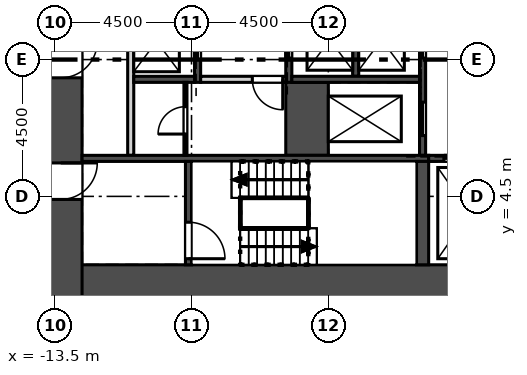
"""IFC4 building model, lengths in metres.
Left out: names, types, materials, properties, quantities, classifications, styles, units other than length and angle.
Written with IfcOpenShell. Run it as: python <this file> out.ifc"""

import sys

from ifc_helpers import new_model, si_unit, direction, frame, frame_2d, origin, place, context, subcontext, project, spatial, rectangle, extrude, element, fill, save


model = new_model("IFC4")
c1 = context("Model", 3, precision=1e-05, world=origin(), true_north=direction((0.0, 1.0)))
c2 = subcontext(c1, "Body", "Model", "MODEL_VIEW")
j1 = project(units=[si_unit("LENGTHUNIT", "METRE"), si_unit("PLANEANGLEUNIT", "RADIAN")], contexts=[c1])
p1 = place(None, origin())
s1 = spatial("IfcSite", under=j1, at=p1, CompositionType="ELEMENT")
p2 = place(p1, origin())
s2 = spatial("IfcBuilding", under=s1, at=p2, CompositionType="ELEMENT")
p3 = place(p2, frame((0.0, 0.0, 14.0)))
s3 = spatial("IfcBuildingStorey", under=s2, at=p3, CompositionType="ELEMENT", Elevation=14.0)
p4 = place(p3, frame((-14.0, 1.55, 0.0), z_axis=(0.0, 0.0, 1.0), x_axis=(1.0, 0.0, 0.0)))
e1 = element("IfcWall", 1, at=p4, inside=s3, PredefinedType="SHEAR", context=c2, shape_type="SweptSolid", body=[
    extrude(rectangle(XDim=28.0, YDim=1.4, at=frame_2d((14.0, 0.0))), origin(), (0.0, 0.0, 1.0), 6.0),
])
p5 = place(p3, frame((-13.3, 11.052, 0.0), z_axis=(0.0, 0.0, 1.0), x_axis=(0.0, -1.0, 0.0)))
e2 = element("IfcWall", 2, at=p5, inside=s3, PredefinedType="SHEAR", context=c2, shape_type="SweptSolid", body=[
    extrude(rectangle(XDim=10.202, YDim=1.4, at=frame_2d((5.101, 0.0))), origin(), (0.0, 0.0, 1.0), 6.0),
])
p6 = place(p5, frame((5.453, 0.0, 0.0)))
e3 = element("IfcOpeningElement", 3, at=p6, cuts=e2, PredefinedType="OPENING", context=c2, shape_type="SweptSolid", body=[
    extrude(rectangle(XDim=1.2, YDim=2.1, at=frame_2d((0.6, 1.05))), frame((0.0, 0.71, 0.0), z_axis=(0.0, -1.0, 0.0), x_axis=(1.0, 0.0, 0.0)), (0.0, 0.0, 1.0), 1.42),
])
p7 = place(p5, frame((1.453, 0.0, 0.0)))
e4 = element("IfcOpeningElement", 4, at=p7, cuts=e2, PredefinedType="OPENING", context=c2, shape_type="SweptSolid", body=[
    extrude(rectangle(XDim=1.2, YDim=2.1, at=frame_2d((0.6, 1.05))), frame((0.0, 0.71, 0.0), z_axis=(0.0, -1.0, 0.0), x_axis=(1.0, 0.0, 0.0)), (0.0, 0.0, 1.0), 1.42),
])
p8 = place(p3, frame((-4.853, 74.393, 0.0), z_axis=(0.0, 0.0, 1.0), x_axis=(-0.49999894854, -0.866026010844, 0.0)))
e5 = element("IfcWall", 5, at=p8, inside=s3, PredefinedType="SOLIDWALL", context=c2, shape_type="SweptSolid", body=[
    extrude(rectangle(XDim=76.0, YDim=0.34, at=frame_2d((38.0, 0.0))), origin(), (0.0, 0.0, 1.0), 5.7),
])
p9 = place(p8, frame((1.058, 0.0, 0.9)))
e6 = element("IfcOpeningElement", 6, at=p9, cuts=e5, PredefinedType="OPENING", context=c2, shape_type="SweptSolid", body=[
    extrude(rectangle(XDim=1.885, YDim=3.5, at=frame_2d((0.942, 1.75))), frame((0.0, 0.18, 0.0), z_axis=(0.0, -1.0, 0.0), x_axis=(1.0, 0.0, 0.0)), (0.0, 0.0, 1.0), 0.36),
])
p10 = place(p8, frame((4.058, 0.0, 0.9)))
e7 = element("IfcOpeningElement", 7, at=p10, cuts=e5, PredefinedType="OPENING", context=c2, shape_type="SweptSolid", body=[
    extrude(rectangle(XDim=1.885, YDim=3.5, at=frame_2d((0.942, 1.75))), frame((0.0, 0.18, 0.0), z_axis=(0.0, -1.0, 0.0), x_axis=(1.0, 0.0, 0.0)), (0.0, 0.0, 1.0), 0.36),
])
p11 = place(p8, frame((7.058, 0.0, 0.9)))
e8 = element("IfcOpeningElement", 8, at=p11, cuts=e5, PredefinedType="OPENING", context=c2, shape_type="SweptSolid", body=[
    extrude(rectangle(XDim=1.885, YDim=3.5, at=frame_2d((0.942, 1.75))), frame((0.0, 0.18, 0.0), z_axis=(0.0, -1.0, 0.0), x_axis=(1.0, 0.0, 0.0)), (0.0, 0.0, 1.0), 0.36),
])
p12 = place(p8, frame((10.058, 0.0, 0.9)))
e9 = element("IfcOpeningElement", 9, at=p12, cuts=e5, PredefinedType="OPENING", context=c2, shape_type="SweptSolid", body=[
    extrude(rectangle(XDim=1.885, YDim=3.5, at=frame_2d((0.942, 1.75))), frame((0.0, 0.18, 0.0), z_axis=(0.0, -1.0, 0.0), x_axis=(1.0, 0.0, 0.0)), (0.0, 0.0, 1.0), 0.36),
])
p13 = place(p8, frame((13.058, 0.0, 0.9)))
e10 = element("IfcOpeningElement", 10, at=p13, cuts=e5, PredefinedType="OPENING", context=c2, shape_type="SweptSolid", body=[
    extrude(rectangle(XDim=1.885, YDim=3.5, at=frame_2d((0.942, 1.75))), frame((0.0, 0.18, 0.0), z_axis=(0.0, -1.0, 0.0), x_axis=(1.0, 0.0, 0.0)), (0.0, 0.0, 1.0), 0.36),
])
p14 = place(p8, frame((16.058, 0.0, 0.9)))
e11 = element("IfcOpeningElement", 11, at=p14, cuts=e5, PredefinedType="OPENING", context=c2, shape_type="SweptSolid", body=[
    extrude(rectangle(XDim=1.885, YDim=3.5, at=frame_2d((0.942, 1.75))), frame((0.0, 0.18, 0.0), z_axis=(0.0, -1.0, 0.0), x_axis=(1.0, 0.0, 0.0)), (0.0, 0.0, 1.0), 0.36),
])
p15 = place(p8, frame((19.058, 0.0, 0.9)))
e12 = element("IfcOpeningElement", 12, at=p15, cuts=e5, PredefinedType="OPENING", context=c2, shape_type="SweptSolid", body=[
    extrude(rectangle(XDim=1.885, YDim=3.5, at=frame_2d((0.942, 1.75))), frame((0.0, 0.18, 0.0), z_axis=(0.0, -1.0, 0.0), x_axis=(1.0, 0.0, 0.0)), (0.0, 0.0, 1.0), 0.36),
])
p16 = place(p8, frame((22.058, 0.0, 0.9)))
e13 = element("IfcOpeningElement", 13, at=p16, cuts=e5, PredefinedType="OPENING", context=c2, shape_type="SweptSolid", body=[
    extrude(rectangle(XDim=1.885, YDim=3.5, at=frame_2d((0.942, 1.75))), frame((0.0, 0.18, 0.0), z_axis=(0.0, -1.0, 0.0), x_axis=(1.0, 0.0, 0.0)), (0.0, 0.0, 1.0), 0.36),
])
p17 = place(p8, frame((25.058, 0.0, 0.9)))
e14 = element("IfcOpeningElement", 14, at=p17, cuts=e5, PredefinedType="OPENING", context=c2, shape_type="SweptSolid", body=[
    extrude(rectangle(XDim=1.885, YDim=3.5, at=frame_2d((0.942, 1.75))), frame((0.0, 0.18, 0.0), z_axis=(0.0, -1.0, 0.0), x_axis=(1.0, 0.0, 0.0)), (0.0, 0.0, 1.0), 0.36),
])
p18 = place(p8, frame((28.058, 0.0, 0.9)))
e15 = element("IfcOpeningElement", 15, at=p18, cuts=e5, PredefinedType="OPENING", context=c2, shape_type="SweptSolid", body=[
    extrude(rectangle(XDim=1.885, YDim=3.5, at=frame_2d((0.942, 1.75))), frame((0.0, 0.18, 0.0), z_axis=(0.0, -1.0, 0.0), x_axis=(1.0, 0.0, 0.0)), (0.0, 0.0, 1.0), 0.36),
])
p19 = place(p8, frame((31.058, 0.0, 0.9)))
e16 = element("IfcOpeningElement", 16, at=p19, cuts=e5, PredefinedType="OPENING", context=c2, shape_type="SweptSolid", body=[
    extrude(rectangle(XDim=1.885, YDim=3.5, at=frame_2d((0.942, 1.75))), frame((0.0, 0.18, 0.0), z_axis=(0.0, -1.0, 0.0), x_axis=(1.0, 0.0, 0.0)), (0.0, 0.0, 1.0), 0.36),
])
p20 = place(p8, frame((34.058, 0.0, 0.9)))
e17 = element("IfcOpeningElement", 17, at=p20, cuts=e5, PredefinedType="OPENING", context=c2, shape_type="SweptSolid", body=[
    extrude(rectangle(XDim=1.885, YDim=3.5, at=frame_2d((0.942, 1.75))), frame((0.0, 0.18, 0.0), z_axis=(0.0, -1.0, 0.0), x_axis=(1.0, 0.0, 0.0)), (0.0, 0.0, 1.0), 0.36),
])
p21 = place(p8, frame((37.058, 0.0, 0.9)))
e18 = element("IfcOpeningElement", 18, at=p21, cuts=e5, PredefinedType="OPENING", context=c2, shape_type="SweptSolid", body=[
    extrude(rectangle(XDim=1.885, YDim=3.5, at=frame_2d((0.942, 1.75))), frame((0.0, 0.18, 0.0), z_axis=(0.0, -1.0, 0.0), x_axis=(1.0, 0.0, 0.0)), (0.0, 0.0, 1.0), 0.36),
])
p22 = place(p8, frame((40.058, 0.0, 0.9)))
e19 = element("IfcOpeningElement", 19, at=p22, cuts=e5, PredefinedType="OPENING", context=c2, shape_type="SweptSolid", body=[
    extrude(rectangle(XDim=1.885, YDim=3.5, at=frame_2d((0.942, 1.75))), frame((0.0, 0.18, 0.0), z_axis=(0.0, -1.0, 0.0), x_axis=(1.0, 0.0, 0.0)), (0.0, 0.0, 1.0), 0.36),
])
p23 = place(p8, frame((43.058, 0.0, 0.9)))
e20 = element("IfcOpeningElement", 20, at=p23, cuts=e5, PredefinedType="OPENING", context=c2, shape_type="SweptSolid", body=[
    extrude(rectangle(XDim=1.885, YDim=3.5, at=frame_2d((0.942, 1.75))), frame((0.0, 0.18, 0.0), z_axis=(0.0, -1.0, 0.0), x_axis=(1.0, 0.0, 0.0)), (0.0, 0.0, 1.0), 0.36),
])
p24 = place(p8, frame((46.058, 0.0, 0.9)))
e21 = element("IfcOpeningElement", 21, at=p24, cuts=e5, PredefinedType="OPENING", context=c2, shape_type="SweptSolid", body=[
    extrude(rectangle(XDim=1.885, YDim=3.5, at=frame_2d((0.942, 1.75))), frame((0.0, 0.18, 0.0), z_axis=(0.0, -1.0, 0.0), x_axis=(1.0, 0.0, 0.0)), (0.0, 0.0, 1.0), 0.36),
])
p25 = place(p8, frame((49.058, 0.0, 0.9)))
e22 = element("IfcOpeningElement", 22, at=p25, cuts=e5, PredefinedType="OPENING", context=c2, shape_type="SweptSolid", body=[
    extrude(rectangle(XDim=1.885, YDim=3.5, at=frame_2d((0.942, 1.75))), frame((0.0, 0.18, 0.0), z_axis=(0.0, -1.0, 0.0), x_axis=(1.0, 0.0, 0.0)), (0.0, 0.0, 1.0), 0.36),
])
p26 = place(p8, frame((52.058, 0.0, 0.9)))
e23 = element("IfcOpeningElement", 23, at=p26, cuts=e5, PredefinedType="OPENING", context=c2, shape_type="SweptSolid", body=[
    extrude(rectangle(XDim=1.885, YDim=3.5, at=frame_2d((0.942, 1.75))), frame((0.0, 0.18, 0.0), z_axis=(0.0, -1.0, 0.0), x_axis=(1.0, 0.0, 0.0)), (0.0, 0.0, 1.0), 0.36),
])
p27 = place(p8, frame((55.058, 0.0, 0.9)))
e24 = element("IfcOpeningElement", 24, at=p27, cuts=e5, PredefinedType="OPENING", context=c2, shape_type="SweptSolid", body=[
    extrude(rectangle(XDim=1.885, YDim=3.5, at=frame_2d((0.942, 1.75))), frame((0.0, 0.18, 0.0), z_axis=(0.0, -1.0, 0.0), x_axis=(1.0, 0.0, 0.0)), (0.0, 0.0, 1.0), 0.36),
])
p28 = place(p8, frame((58.058, 0.0, 0.9)))
e25 = element("IfcOpeningElement", 25, at=p28, cuts=e5, PredefinedType="OPENING", context=c2, shape_type="SweptSolid", body=[
    extrude(rectangle(XDim=1.885, YDim=3.5, at=frame_2d((0.942, 1.75))), frame((0.0, 0.18, 0.0), z_axis=(0.0, -1.0, 0.0), x_axis=(1.0, 0.0, 0.0)), (0.0, 0.0, 1.0), 0.36),
])
p29 = place(p8, frame((61.058, 0.0, 0.9)))
e26 = element("IfcOpeningElement", 26, at=p29, cuts=e5, PredefinedType="OPENING", context=c2, shape_type="SweptSolid", body=[
    extrude(rectangle(XDim=1.885, YDim=3.5, at=frame_2d((0.942, 1.75))), frame((0.0, 0.18, 0.0), z_axis=(0.0, -1.0, 0.0), x_axis=(1.0, 0.0, 0.0)), (0.0, 0.0, 1.0), 0.36),
])
p30 = place(p8, frame((64.058, 0.0, 0.9)))
e27 = element("IfcOpeningElement", 27, at=p30, cuts=e5, PredefinedType="OPENING", context=c2, shape_type="SweptSolid", body=[
    extrude(rectangle(XDim=1.885, YDim=3.5, at=frame_2d((0.942, 1.75))), frame((0.0, 0.18, 0.0), z_axis=(0.0, -1.0, 0.0), x_axis=(1.0, 0.0, 0.0)), (0.0, 0.0, 1.0), 0.36),
])
p31 = place(p8, frame((67.058, 0.0, 0.9)))
e28 = element("IfcOpeningElement", 28, at=p31, cuts=e5, PredefinedType="OPENING", context=c2, shape_type="SweptSolid", body=[
    extrude(rectangle(XDim=1.885, YDim=3.5, at=frame_2d((0.942, 1.75))), frame((0.0, 0.18, 0.0), z_axis=(0.0, -1.0, 0.0), x_axis=(1.0, 0.0, 0.0)), (0.0, 0.0, 1.0), 0.36),
])
p32 = place(p8, frame((70.058, 0.0, 0.9)))
e29 = element("IfcOpeningElement", 29, at=p32, cuts=e5, PredefinedType="OPENING", context=c2, shape_type="SweptSolid", body=[
    extrude(rectangle(XDim=1.885, YDim=3.5, at=frame_2d((0.942, 1.75))), frame((0.0, 0.18, 0.0), z_axis=(0.0, -1.0, 0.0), x_axis=(1.0, 0.0, 0.0)), (0.0, 0.0, 1.0), 0.36),
])
p33 = place(p8, frame((73.058, 0.0, 0.9)))
e30 = element("IfcOpeningElement", 30, at=p33, cuts=e5, PredefinedType="OPENING", context=c2, shape_type="SweptSolid", body=[
    extrude(rectangle(XDim=1.885, YDim=3.5, at=frame_2d((0.942, 1.75))), frame((0.0, 0.18, 0.0), z_axis=(0.0, -1.0, 0.0), x_axis=(1.0, 0.0, 0.0)), (0.0, 0.0, 1.0), 0.36),
])
p34 = place(p3, frame((-11.0, 5.85, 0.0), z_axis=(0.0, 0.0, 1.0), x_axis=(0.0, 1.0, 0.0)))
e31 = element("IfcWall", 31, at=p34, inside=s3, PredefinedType="SOLIDWALL", context=c2, shape_type="SweptSolid", body=[
    extrude(rectangle(XDim=7.4, YDim=0.2, at=frame_2d((3.7, 0.0))), origin(), (0.0, 0.0, 1.0), 5.7),
])
p35 = place(p3, frame((-8.8, 8.25, -0.3), z_axis=(0.0, 0.0, 1.0), x_axis=(0.0, 1.0, 0.0)))
e32 = element("IfcWall", 32, at=p35, inside=s3, PredefinedType="SOLIDWALL", context=c2, shape_type="SweptSolid", body=[
    extrude(rectangle(XDim=5.2, YDim=0.2, at=frame_2d((2.6, 0.0))), origin(), (0.0, 0.0, 1.0), 6.0),
])
p36 = place(p35, frame((0.75, 0.0, 0.3)))
e33 = element("IfcOpeningElement", 33, at=p36, cuts=e32, PredefinedType="OPENING", context=c2, shape_type="SweptSolid", body=[
    extrude(rectangle(XDim=1.2, YDim=2.1, at=frame_2d((0.6, 1.05))), frame((0.0, 0.11, 0.0), z_axis=(0.0, -1.0, 0.0), x_axis=(1.0, 0.0, 0.0)), (0.0, 0.0, 1.0), 0.22),
])
p37 = place(p35, frame((3.25, 0.0, 0.3)))
e34 = element("IfcOpeningElement", 34, at=p37, cuts=e32, PredefinedType="OPENING", context=c2, shape_type="SweptSolid", body=[
    extrude(rectangle(XDim=1.2, YDim=2.1, at=frame_2d((0.6, 1.05))), frame((0.0, 0.11, 0.0), z_axis=(0.0, -1.0, 0.0), x_axis=(1.0, 0.0, 0.0)), (0.0, 0.0, 1.0), 0.22),
])
p38 = place(p3, frame((-5.8, 8.25, -0.3), z_axis=(0.0, 0.0, 1.0), x_axis=(0.0, 1.0, 0.0)))
e35 = element("IfcWall", 35, at=p38, inside=s3, PredefinedType="SOLIDWALL", context=c2, shape_type="SweptSolid", body=[
    extrude(rectangle(XDim=8.0, YDim=0.2, at=frame_2d((4.0, 0.0))), origin(), (0.0, 0.0, 1.0), 6.0),
])
p39 = place(p38, frame((0.8, 0.0, 0.3)))
e36 = element("IfcOpeningElement", 36, at=p39, cuts=e35, PredefinedType="OPENING", context=c2, shape_type="SweptSolid", body=[
    extrude(rectangle(XDim=1.2, YDim=2.1, at=frame_2d((0.6, 1.05))), frame((0.0, 0.11, 0.0), z_axis=(0.0, -1.0, 0.0), x_axis=(1.0, 0.0, 0.0)), (0.0, 0.0, 1.0), 0.22),
])
p40 = place(p38, frame((3.4, 0.0, 0.3)))
e37 = element("IfcOpeningElement", 37, at=p40, cuts=e35, PredefinedType="OPENING", context=c2, shape_type="SweptSolid", body=[
    extrude(rectangle(XDim=1.2, YDim=2.1, at=frame_2d((0.6, 1.05))), frame((0.0, 0.11, 0.0), z_axis=(0.0, -1.0, 0.0), x_axis=(1.0, 0.0, 0.0)), (0.0, 0.0, 1.0), 0.22),
])
p41 = place(p38, frame((6.0, 0.0, 0.3)))
e38 = element("IfcOpeningElement", 38, at=p41, cuts=e35, PredefinedType="OPENING", context=c2, shape_type="SweptSolid", body=[
    extrude(rectangle(XDim=1.2, YDim=2.1, at=frame_2d((0.6, 1.05))), frame((0.0, 0.11, 0.0), z_axis=(0.0, -1.0, 0.0), x_axis=(1.0, 0.0, 0.0)), (0.0, 0.0, 1.0), 0.22),
])
p42 = place(p3, frame((-3.6, 8.45, -0.3), z_axis=(0.0, 0.0, 1.0), x_axis=(0.0, 1.0, 0.0)))
e39 = element("IfcWall", 39, at=p42, inside=s3, PredefinedType="SOLIDWALL", context=c2, shape_type="SweptSolid", body=[
    extrude(rectangle(XDim=7.8, YDim=0.2, at=frame_2d((3.9, 0.0))), origin(), (0.0, 0.0, 1.0), 6.0),
])
p43 = place(p3, frame((-1.4, 5.85, -0.3), z_axis=(0.0, 0.0, 1.0), x_axis=(0.0, 1.0, 0.0)))
e40 = element("IfcWall", 40, at=p43, inside=s3, PredefinedType="SOLIDWALL", context=c2, shape_type="SweptSolid", body=[
    extrude(rectangle(XDim=11.75, YDim=0.2, at=frame_2d((5.875, 0.0))), origin(), (0.0, 0.0, 1.0), 6.0),
])
p44 = place(p43, frame((3.2, 0.0, 0.3)))
e41 = element("IfcOpeningElement", 41, at=p44, cuts=e40, PredefinedType="OPENING", context=c2, shape_type="SweptSolid", body=[
    extrude(rectangle(XDim=1.2, YDim=2.1, at=frame_2d((0.6, 1.05))), frame((0.0, 0.11, 0.0), z_axis=(0.0, -1.0, 0.0), x_axis=(1.0, 0.0, 0.0)), (0.0, 0.0, 1.0), 0.22),
])
p45 = place(p43, frame((0.65, 0.0, 0.3)))
e42 = element("IfcOpeningElement", 42, at=p45, cuts=e40, PredefinedType="OPENING", context=c2, shape_type="SweptSolid", body=[
    extrude(rectangle(XDim=1.1, YDim=2.1, at=frame_2d((0.55, 1.05))), frame((0.0, 0.11, 0.0), z_axis=(0.0, -1.0, 0.0), x_axis=(1.0, 0.0, 0.0)), (0.0, 0.0, 1.0), 0.22),
])
p46 = place(p3, frame((-5.2, 5.85, -0.3), z_axis=(0.0, 0.0, 1.0), x_axis=(0.0, 1.0, 0.0)))
e43 = element("IfcWall", 43, at=p46, inside=s3, PredefinedType="SOLIDWALL", context=c2, shape_type="SweptSolid", body=[
    extrude(rectangle(XDim=2.4, YDim=1.4, at=frame_2d((1.2, 0.0))), origin(), (0.0, 0.0, 1.0), 6.0),
])
p47 = place(p3, frame((-10.9, 8.35, -0.3), z_axis=(0.0, 0.0, 1.0), x_axis=(1.0, 0.0, 0.0)))
e44 = element("IfcWall", 44, at=p47, inside=s3, PredefinedType="SOLIDWALL", context=c2, shape_type="SweptSolid", body=[
    extrude(rectangle(XDim=2.0, YDim=0.2, at=frame_2d((1.0, 0.0))), origin(), (0.0, 0.0, 1.0), 6.0),
])
p48 = place(p3, frame((-5.7, 8.35, -0.3), z_axis=(0.0, 0.0, 1.0), x_axis=(1.0, 0.0, 0.0)))
e45 = element("IfcWall", 45, at=p48, inside=s3, PredefinedType="SOLIDWALL", context=c2, shape_type="SweptSolid", body=[
    extrude(rectangle(XDim=4.2, YDim=0.2, at=frame_2d((2.1, 0.0))), origin(), (0.0, 0.0, 1.0), 6.0),
])
p49 = place(p3, frame((-12.6, 5.75, -0.3), z_axis=(0.0, 0.0, 1.0), x_axis=(1.0, 0.0, 0.0)))
e46 = element("IfcWall", 46, at=p49, inside=s3, PredefinedType="SOLIDWALL", context=c2, shape_type="SweptSolid", body=[
    extrude(rectangle(XDim=11.4, YDim=0.2, at=frame_2d((5.7, 0.0))), origin(), (0.0, 0.0, 1.0), 6.0),
])
p50 = place(p3, frame((-1.2, 5.75, -0.3), z_axis=(0.0, 0.0, 1.0), x_axis=(1.0, 0.0, 0.0)))
e47 = element("IfcWall", 47, at=p50, inside=s3, PredefinedType="SOLIDWALL", context=c2, shape_type="SweptSolid", body=[
    extrude(rectangle(XDim=2.4, YDim=0.2, at=frame_2d((1.2, 0.0))), origin(), (0.0, 0.0, 1.0), 6.0),
])
p51 = place(p50, frame((0.5, 0.0, 0.3)))
e48 = element("IfcOpeningElement", 48, at=p51, cuts=e47, PredefinedType="OPENING", context=c2, shape_type="SweptSolid", body=[
    extrude(rectangle(XDim=1.4, YDim=2.1, at=frame_2d((0.7, 1.05))), frame((0.0, 0.11, 0.0), z_axis=(0.0, -1.0, 0.0), x_axis=(1.0, 0.0, 0.0)), (0.0, 0.0, 1.0), 0.22),
])
p52 = place(p3, frame((-9.1, 2.25, -0.3), z_axis=(0.0, 0.0, 1.0), x_axis=(0.0, 1.0, 0.0)))
e49 = element("IfcWall", 49, at=p52, inside=s3, PredefinedType="SOLIDWALL", context=c2, shape_type="SweptSolid", body=[
    extrude(rectangle(XDim=3.4, YDim=0.2, at=frame_2d((1.7, 0.0))), origin(), (0.0, 0.0, 1.0), 6.0),
])
p53 = place(p52, frame((0.2, 0.0, 0.3)))
e50 = element("IfcOpeningElement", 50, at=p53, cuts=e49, PredefinedType="OPENING", context=c2, shape_type="SweptSolid", body=[
    extrude(rectangle(XDim=1.2, YDim=2.1, at=frame_2d((0.6, 1.05))), frame((0.0, 0.11, 0.0), z_axis=(0.0, -1.0, 0.0), x_axis=(1.0, 0.0, 0.0)), (0.0, 0.0, 1.0), 0.22),
])
p54 = place(p3, frame((-1.4, 2.25, -0.3), z_axis=(0.0, 0.0, 1.0), x_axis=(0.0, 1.0, 0.0)))
e51 = element("IfcWall", 51, at=p54, inside=s3, PredefinedType="SOLIDWALL", context=c2, shape_type="SweptSolid", body=[
    extrude(rectangle(XDim=3.4, YDim=0.4, at=frame_2d((1.7, 0.0))), origin(), (0.0, 0.0, 1.0), 6.0),
])
p55 = place(p3, frame((-9.2, 5.85, 0.0), z_axis=(0.0, 0.0, 1.0), x_axis=(0.0, 1.0, 0.0)))
e52 = element("IfcWall", 52, at=p55, inside=s3, PredefinedType="PARTITIONING", context=c2, shape_type="SweptSolid", body=[
    extrude(rectangle(XDim=2.4, YDim=0.1, at=frame_2d((1.2, 0.0))), origin(), (0.0, 0.0, 1.0), 5.7),
])
p56 = place(p55, frame((0.7, 0.0, 0.0)))
e53 = element("IfcOpeningElement", 53, at=p56, cuts=e52, PredefinedType="OPENING", context=c2, shape_type="SweptSolid", body=[
    extrude(rectangle(XDim=0.9, YDim=2.1, at=frame_2d((0.45, 1.05))), frame((0.0, 0.06, 0.0), z_axis=(0.0, -1.0, 0.0), x_axis=(1.0, 0.0, 0.0)), (0.0, 0.0, 1.0), 0.12),
])
p57 = place(p3, frame((-8.7, 8.35, 0.0), z_axis=(0.0, 0.0, 1.0), x_axis=(1.0, 0.0, 0.0)))
e54 = element("IfcWall", 54, at=p57, inside=s3, PredefinedType="SOLIDWALL", context=c2, shape_type="SweptSolid", body=[
    extrude(rectangle(XDim=2.8, YDim=0.2, at=frame_2d((1.4, 0.0))), origin(), (0.0, 0.0, 1.0), 5.7),
])
p58 = place(p57, frame((1.7, 0.0, 0.0)))
e55 = element("IfcOpeningElement", 55, at=p58, cuts=e54, PredefinedType="OPENING", context=c2, shape_type="SweptSolid", body=[
    extrude(rectangle(XDim=1.0, YDim=2.1, at=frame_2d((0.5, 1.05))), frame((0.0, 0.11, 0.0), z_axis=(0.0, -1.0, 0.0), x_axis=(1.0, 0.0, 0.0)), (0.0, 0.0, 1.0), 0.22),
])
p59 = place(p36, origin())
e56 = element("IfcDoor", 56, at=p59, inside=s3, OperationType="SLIDING_TO_LEFT", PredefinedType="DOOR", context=c2, shape_type="SweptSolid", body=[
    extrude(rectangle(XDim=1.2, YDim=2.1, at=frame_2d((0.6, 1.05))), frame((0.0, 0.025, 0.0), z_axis=(0.0, -1.0, 0.0), x_axis=(1.0, 0.0, 0.0)), (0.0, 0.0, 1.0), 0.05),
])
fill(e33, e56)
p60 = place(p39, origin())
e57 = element("IfcDoor", 57, at=p60, inside=s3, OperationType="SLIDING_TO_LEFT", PredefinedType="DOOR", context=c2, shape_type="SweptSolid", body=[
    extrude(rectangle(XDim=1.2, YDim=2.1, at=frame_2d((0.6, 1.05))), frame((0.0, 0.025, 0.0), z_axis=(0.0, -1.0, 0.0), x_axis=(1.0, 0.0, 0.0)), (0.0, 0.0, 1.0), 0.05),
])
fill(e36, e57)
p61 = place(p44, origin())
e58 = element("IfcDoor", 58, at=p61, inside=s3, OperationType="SLIDING_TO_LEFT", PredefinedType="DOOR", context=c2, shape_type="SweptSolid", body=[
    extrude(rectangle(XDim=1.2, YDim=2.1, at=frame_2d((0.6, 1.05))), frame((0.0, 0.025, 0.0), z_axis=(0.0, -1.0, 0.0), x_axis=(1.0, 0.0, 0.0)), (0.0, 0.0, 1.0), 0.05),
])
fill(e41, e58)
p62 = place(p45, origin())
e59 = element("IfcDoor", 59, at=p62, inside=s3, OperationType="SLIDING_TO_RIGHT", PredefinedType="DOOR", context=c2, shape_type="SweptSolid", body=[
    extrude(rectangle(XDim=1.1, YDim=2.1, at=frame_2d((0.55, 1.05))), frame((0.0, 0.025, 0.0), z_axis=(0.0, -1.0, 0.0), x_axis=(1.0, 0.0, 0.0)), (0.0, 0.0, 1.0), 0.05),
])
fill(e42, e59)
p63 = place(p51, origin())
e60 = element("IfcDoor", 60, at=p63, inside=s3, OperationType="SLIDING_TO_LEFT", PredefinedType="DOOR", context=c2, shape_type="SweptSolid", body=[
    extrude(rectangle(XDim=1.4, YDim=2.1, at=frame_2d((0.7, 1.05))), frame((0.0, 0.025, 0.0), z_axis=(0.0, -1.0, 0.0), x_axis=(1.0, 0.0, 0.0)), (0.0, 0.0, 1.0), 0.05),
])
fill(e48, e60)
p64 = place(p58, frame((1.0, 0.0, 0.0), z_axis=(0.0, 0.0, 1.0), x_axis=(-1.0, 0.0, 0.0)))
e61 = element("IfcDoor", 61, at=p64, inside=s3, OperationType="SINGLE_SWING_LEFT", PredefinedType="DOOR", context=c2, shape_type="SweptSolid", body=[
    extrude(rectangle(XDim=1.0, YDim=2.1, at=frame_2d((0.5, 1.05))), frame((0.0, 0.025, 0.0), z_axis=(0.0, -1.0, 0.0), x_axis=(1.0, 0.0, 0.0)), (0.0, 0.0, 1.0), 0.05),
])
fill(e55, e61)
p65 = place(p56, origin())
e62 = element("IfcDoor", 62, at=p65, inside=s3, OperationType="SINGLE_SWING_LEFT", PredefinedType="DOOR", context=c2, shape_type="SweptSolid", body=[
    extrude(rectangle(XDim=0.9, YDim=2.1, at=frame_2d((0.45, 1.05))), frame((0.0, 0.025, 0.0), z_axis=(0.0, -1.0, 0.0), x_axis=(1.0, 0.0, 0.0)), (0.0, 0.0, 1.0), 0.05),
])
fill(e53, e62)
p66 = place(p6, origin())
e63 = element("IfcDoor", 63, at=p66, inside=s3, OperationType="SINGLE_SWING_LEFT", PredefinedType="DOOR", context=c2, shape_type="SweptSolid", body=[
    extrude(rectangle(XDim=1.2, YDim=2.1, at=frame_2d((0.6, 1.05))), frame((0.0, 0.025, 0.0), z_axis=(0.0, -1.0, 0.0), x_axis=(1.0, 0.0, 0.0)), (0.0, 0.0, 1.0), 0.05),
])
fill(e3, e63)
p67 = place(p53, frame((1.2, 0.0, 0.0), z_axis=(0.0, 0.0, 1.0), x_axis=(-1.0, 0.0, 0.0)))
e64 = element("IfcDoor", 64, at=p67, inside=s3, OperationType="SINGLE_SWING_RIGHT", PredefinedType="DOOR", context=c2, shape_type="SweptSolid", body=[
    extrude(rectangle(XDim=1.2, YDim=2.1, at=frame_2d((0.6, 1.05))), frame((0.0, 0.025, 0.0), z_axis=(0.0, -1.0, 0.0), x_axis=(1.0, 0.0, 0.0)), (0.0, 0.0, 1.0), 0.05),
])
fill(e50, e64)
p68 = place(p7, origin())
e65 = element("IfcDoor", 65, at=p68, inside=s3, OperationType="SINGLE_SWING_LEFT", PredefinedType="DOOR", context=c2, shape_type="SweptSolid", body=[
    extrude(rectangle(XDim=1.2, YDim=2.1, at=frame_2d((0.6, 1.05))), frame((0.0, 0.025, 0.0), z_axis=(0.0, -1.0, 0.0), x_axis=(1.0, 0.0, 0.0)), (0.0, 0.0, 1.0), 0.05),
])
fill(e4, e65)
save(model, sys.argv[1])
